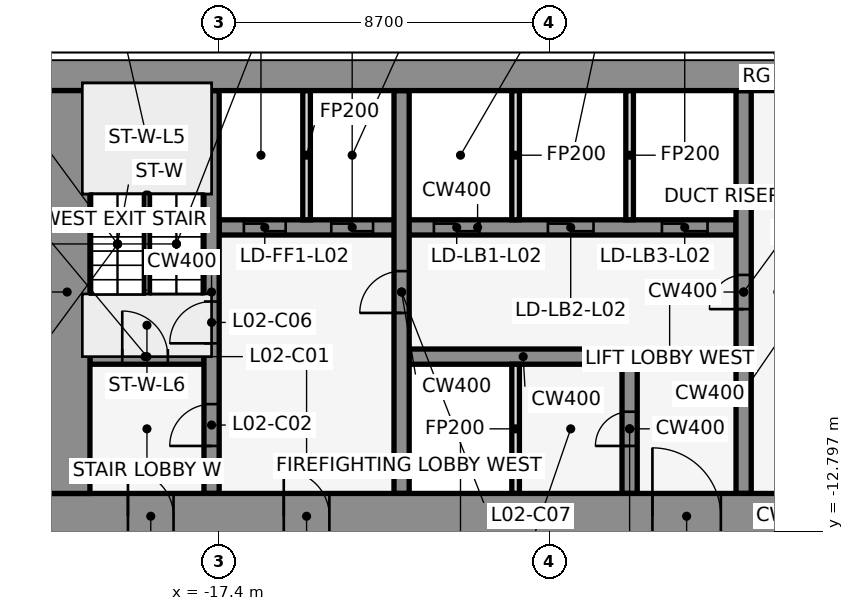
"""IFC4 building model, lengths in metres.
Left out: names, types, materials, properties, quantities, classifications, styles, units other than length and angle.
Written with IfcOpenShell. Run it as: python <this file> out.ifc"""

import sys

from ifc_helpers import new_model, si_unit, direction, frame, frame_2d, origin, place, context, subcontext, project, spatial, rectangle, extrude, element, fill, save


model = new_model("IFC4")
c1 = context("Model", 3, precision=1e-05, world=origin(), true_north=direction((0.0, 1.0)))
c2 = subcontext(c1, "Body", "Model", "MODEL_VIEW")
j1 = project(units=[si_unit("LENGTHUNIT", "METRE"), si_unit("PLANEANGLEUNIT", "RADIAN")], contexts=[c1])
p1 = place(None, origin())
s1 = spatial("IfcSite", under=j1, at=p1, CompositionType="ELEMENT")
p2 = place(p1, origin())
s2 = spatial("IfcBuilding", under=s1, at=p2, CompositionType="ELEMENT")
p3 = place(p2, frame((0.0, 0.0, 14.0)))
s3 = spatial("IfcBuildingStorey", under=s2, at=p3, CompositionType="ELEMENT", Elevation=14.0)
p4 = place(p3, frame((-20.8, -8.2, 0.0), z_axis=(0.0, 0.0, 1.0), x_axis=(1.0, 0.0, 0.0)))
e1 = element("IfcWall", 1, at=p4, inside=s3, PredefinedType="SHEAR", context=c2, shape_type="SweptSolid", body=[
    extrude(rectangle(XDim=3.0, YDim=0.4, at=frame_2d((1.5, 0.0))), origin(), (0.0, 0.0, 1.0), 6.0),
])
p5 = place(p4, frame((0.85, 0.0, 0.0)))
e2 = element("IfcOpeningElement", 2, at=p5, cuts=e1, PredefinedType="OPENING", context=c2, shape_type="SweptSolid", body=[
    extrude(rectangle(XDim=1.2, YDim=2.1, at=frame_2d((0.6, 1.05))), frame((0.0, 0.212, 0.0), z_axis=(0.0, -1.0, 0.0), x_axis=(1.0, 0.0, 0.0)), (0.0, 0.0, 1.0), 0.424),
])
p6 = place(p3, frame((-12.4, -8.2, 0.0), z_axis=(0.0, 0.0, 1.0), x_axis=(1.0, 0.0, 0.0)))
e3 = element("IfcWall", 3, at=p6, inside=s3, PredefinedType="SHEAR", context=c2, shape_type="SweptSolid", body=[
    extrude(rectangle(XDim=6.0, YDim=0.4, at=frame_2d((3.0, 0.0))), origin(), (0.0, 0.0, 1.0), 6.0),
])
p7 = place(p3, frame((-17.4, -4.8, 0.0), z_axis=(0.0, 0.0, 1.0), x_axis=(1.0, 0.0, 0.0)))
e4 = element("IfcWall", 4, at=p7, inside=s3, PredefinedType="SHEAR", context=c2, shape_type="SweptSolid", body=[
    extrude(rectangle(XDim=13.6, YDim=0.4, at=frame_2d((6.8, 0.0))), origin(), (0.0, 0.0, 1.0), 6.0),
])
p8 = place(p7, frame((0.65, 0.0, 0.0)))
e5 = element("IfcOpeningElement", 5, at=p8, cuts=e4, PredefinedType="OPENING", context=c2, shape_type="SweptSolid", body=[
    extrude(rectangle(XDim=1.1, YDim=2.1, at=frame_2d((0.55, 1.05))), frame((0.0, 0.212, 0.0), z_axis=(0.0, -1.0, 0.0), x_axis=(1.0, 0.0, 0.0)), (0.0, 0.0, 1.0), 0.424),
])
p9 = place(p7, frame((2.95, 0.0, 0.0)))
e6 = element("IfcOpeningElement", 6, at=p9, cuts=e4, PredefinedType="OPENING", context=c2, shape_type="SweptSolid", body=[
    extrude(rectangle(XDim=1.1, YDim=2.1, at=frame_2d((0.55, 1.05))), frame((0.0, 0.212, 0.0), z_axis=(0.0, -1.0, 0.0), x_axis=(1.0, 0.0, 0.0)), (0.0, 0.0, 1.0), 0.424),
])
p10 = place(p7, frame((5.65, 0.0, 0.0)))
e7 = element("IfcOpeningElement", 7, at=p10, cuts=e4, PredefinedType="OPENING", context=c2, shape_type="SweptSolid", body=[
    extrude(rectangle(XDim=1.2, YDim=2.1, at=frame_2d((0.6, 1.05))), frame((0.0, 0.212, 0.0), z_axis=(0.0, -1.0, 0.0), x_axis=(1.0, 0.0, 0.0)), (0.0, 0.0, 1.0), 0.424),
])
p11 = place(p7, frame((8.65, 0.0, 0.0)))
e8 = element("IfcOpeningElement", 8, at=p11, cuts=e4, PredefinedType="OPENING", context=c2, shape_type="SweptSolid", body=[
    extrude(rectangle(XDim=1.2, YDim=2.1, at=frame_2d((0.6, 1.05))), frame((0.0, 0.212, 0.0), z_axis=(0.0, -1.0, 0.0), x_axis=(1.0, 0.0, 0.0)), (0.0, 0.0, 1.0), 0.424),
])
p12 = place(p7, frame((11.65, 0.0, 0.0)))
e9 = element("IfcOpeningElement", 9, at=p12, cuts=e4, PredefinedType="OPENING", context=c2, shape_type="SweptSolid", body=[
    extrude(rectangle(XDim=1.2, YDim=2.1, at=frame_2d((0.6, 1.05))), frame((0.0, 0.212, 0.0), z_axis=(0.0, -1.0, 0.0), x_axis=(1.0, 0.0, 0.0)), (0.0, 0.0, 1.0), 0.424),
])
p13 = place(p3, frame((-17.6, -11.8, 0.0), z_axis=(0.0, 0.0, 1.0), x_axis=(0.0, 1.0, 0.0)))
e10 = element("IfcWall", 10, at=p13, inside=s3, PredefinedType="SHEAR", context=c2, shape_type="SweptSolid", body=[
    extrude(rectangle(XDim=10.6, YDim=0.4, at=frame_2d((5.3, 0.0))), origin(), (0.0, 0.0, 1.0), 6.0),
])
p14 = place(p13, frame((1.25, 0.0, 0.0)))
e11 = element("IfcOpeningElement", 11, at=p14, cuts=e10, PredefinedType="OPENING", context=c2, shape_type="SweptSolid", body=[
    extrude(rectangle(XDim=1.1, YDim=2.1, at=frame_2d((0.55, 1.05))), frame((0.0, 0.212, 0.0), z_axis=(0.0, -1.0, 0.0), x_axis=(1.0, 0.0, 0.0)), (0.0, 0.0, 1.0), 0.424),
])
p15 = place(p13, frame((3.95, 0.0, 0.0)))
e12 = element("IfcOpeningElement", 12, at=p15, cuts=e10, PredefinedType="OPENING", context=c2, shape_type="SweptSolid", body=[
    extrude(rectangle(XDim=1.1, YDim=2.1, at=frame_2d((0.55, 1.05))), frame((0.0, 0.212, 0.0), z_axis=(0.0, -1.0, 0.0), x_axis=(1.0, 0.0, 0.0)), (0.0, 0.0, 1.0), 0.424),
])
p16 = place(p3, frame((-15.1, -4.6, 0.0), z_axis=(0.0, 0.0, 1.0), x_axis=(0.0, 1.0, 0.0)))
e13 = element("IfcWall", 13, at=p16, inside=s3, PredefinedType="PARTITIONING", context=c2, shape_type="SweptSolid", body=[
    extrude(rectangle(XDim=3.4, YDim=0.2, at=frame_2d((1.7, 0.0))), origin(), (0.0, 0.0, 1.0), 5.7),
])
p17 = place(p3, frame((-12.6, -11.8, 0.0), z_axis=(0.0, 0.0, 1.0), x_axis=(0.0, 1.0, 0.0)))
e14 = element("IfcWall", 14, at=p17, inside=s3, PredefinedType="SHEAR", context=c2, shape_type="SweptSolid", body=[
    extrude(rectangle(XDim=10.6, YDim=0.4, at=frame_2d((5.3, 0.0))), origin(), (0.0, 0.0, 1.0), 6.0),
])
p18 = place(p17, frame((4.75, 0.0, 0.0)))
e15 = element("IfcOpeningElement", 15, at=p18, cuts=e14, PredefinedType="OPENING", context=c2, shape_type="SweptSolid", body=[
    extrude(rectangle(XDim=1.1, YDim=2.1, at=frame_2d((0.55, 1.05))), frame((0.0, 0.212, 0.0), z_axis=(0.0, -1.0, 0.0), x_axis=(1.0, 0.0, 0.0)), (0.0, 0.0, 1.0), 0.424),
])
for number, where, z_axis, x_axis in (
    (16, (-9.6, -11.8, 0.0), (0.0, 0.0, 1.0), (0.0, 1.0, 0.0)),
    (17, (-9.6, -4.6, 0.0), (0.0, 0.0, 1.0), (0.0, 1.0, 0.0)),
):
    element("IfcWall", number, at=place(p3, frame(where, z_axis=z_axis, x_axis=x_axis)), inside=s3, PredefinedType="PARTITIONING", context=c2, shape_type="SweptSolid", body=[
        extrude(rectangle(XDim=3.4, YDim=0.2, at=frame_2d((1.7, 0.0))), origin(), (0.0, 0.0, 1.0), 5.7),
    ])
p19 = place(p3, frame((-6.6, -11.8, 0.0), z_axis=(0.0, 0.0, 1.0), x_axis=(0.0, 1.0, 0.0)))
e18 = element("IfcWall", 18, at=p19, inside=s3, PredefinedType="SHEAR", context=c2, shape_type="SweptSolid", body=[
    extrude(rectangle(XDim=3.4, YDim=0.4, at=frame_2d((1.7, 0.0))), origin(), (0.0, 0.0, 1.0), 6.0),
])
p20 = place(p19, frame((1.25, 0.0, 0.0)))
e19 = element("IfcOpeningElement", 19, at=p20, cuts=e18, PredefinedType="OPENING", context=c2, shape_type="SweptSolid", body=[
    extrude(rectangle(XDim=0.9, YDim=2.1, at=frame_2d((0.45, 1.05))), frame((0.0, 0.212, 0.0), z_axis=(0.0, -1.0, 0.0), x_axis=(1.0, 0.0, 0.0)), (0.0, 0.0, 1.0), 0.424),
])
p21 = place(p3, frame((-6.6, -4.6, 0.0), z_axis=(0.0, 0.0, 1.0), x_axis=(0.0, 1.0, 0.0)))
e20 = element("IfcWall", 20, at=p21, inside=s3, PredefinedType="PARTITIONING", context=c2, shape_type="SweptSolid", body=[
    extrude(rectangle(XDim=3.4, YDim=0.2, at=frame_2d((1.7, 0.0))), origin(), (0.0, 0.0, 1.0), 5.7),
])
p22 = place(p3, frame((-3.6, -11.8, 0.0), z_axis=(0.0, 0.0, 1.0), x_axis=(0.0, 1.0, 0.0)))
e21 = element("IfcWall", 21, at=p22, inside=s3, PredefinedType="SHEAR", context=c2, shape_type="SweptSolid", body=[
    extrude(rectangle(XDim=10.6, YDim=0.4, at=frame_2d((5.3, 0.0))), origin(), (0.0, 0.0, 1.0), 6.0),
])
p23 = place(p22, frame((4.85, 0.0, 0.0)))
e22 = element("IfcOpeningElement", 22, at=p23, cuts=e21, PredefinedType="OPENING", context=c2, shape_type="SweptSolid", body=[
    extrude(rectangle(XDim=0.9, YDim=2.1, at=frame_2d((0.45, 1.05))), frame((0.0, 0.212, 0.0), z_axis=(0.0, -1.0, 0.0), x_axis=(1.0, 0.0, 0.0)), (0.0, 0.0, 1.0), 0.424),
])
p24 = place(p3, frame((-22.0, -0.6, 0.0), z_axis=(0.0, 0.0, 1.0), x_axis=(1.0, 0.0, 0.0)))
e23 = element("IfcWall", 23, at=p24, inside=s3, PredefinedType="SHEAR", context=c2, shape_type="SweptSolid", body=[
    extrude(rectangle(XDim=44.0, YDim=1.2, at=frame_2d((22.0, 0.0))), origin(), (0.0, 0.0, 1.0), 6.0),
])
p25 = place(p3, frame((-22.0, -12.4, 0.0), z_axis=(0.0, 0.0, 1.0), x_axis=(1.0, 0.0, 0.0)))
e24 = element("IfcWall", 24, at=p25, inside=s3, PredefinedType="SHEAR", context=c2, shape_type="SweptSolid", body=[
    extrude(rectangle(XDim=44.0, YDim=1.2, at=frame_2d((22.0, 0.0))), origin(), (0.0, 0.0, 1.0), 6.0),
])
p26 = place(p25, frame((2.2, 0.0, 0.0)))
e25 = element("IfcOpeningElement", 25, at=p26, cuts=e24, PredefinedType="OPENING", context=c2, shape_type="SweptSolid", body=[
    extrude(rectangle(XDim=1.2, YDim=2.1, at=frame_2d((0.6, 1.05))), frame((0.0, 0.612, 0.0), z_axis=(0.0, -1.0, 0.0), x_axis=(1.0, 0.0, 0.0)), (0.0, 0.0, 1.0), 1.224),
])
p27 = place(p25, frame((21.4, 0.0, 0.0)))
e26 = element("IfcOpeningElement", 26, at=p27, cuts=e24, PredefinedType="OPENING", context=c2, shape_type="SweptSolid", body=[
    extrude(rectangle(XDim=1.2, YDim=2.1, at=frame_2d((0.6, 1.05))), frame((0.0, 0.612, 0.0), z_axis=(0.0, -1.0, 0.0), x_axis=(1.0, 0.0, 0.0)), (0.0, 0.0, 1.0), 1.224),
])
p28 = place(p25, frame((40.6, 0.0, 0.0)))
e27 = element("IfcOpeningElement", 27, at=p28, cuts=e24, PredefinedType="OPENING", context=c2, shape_type="SweptSolid", body=[
    extrude(rectangle(XDim=1.2, YDim=2.1, at=frame_2d((0.6, 1.05))), frame((0.0, 0.612, 0.0), z_axis=(0.0, -1.0, 0.0), x_axis=(1.0, 0.0, 0.0)), (0.0, 0.0, 1.0), 1.224),
])
p29 = place(p25, frame((16.0, 0.0, 0.0)))
e28 = element("IfcOpeningElement", 28, at=p29, cuts=e24, PredefinedType="OPENING", context=c2, shape_type="SweptSolid", body=[
    extrude(rectangle(XDim=1.8, YDim=2.1, at=frame_2d((0.9, 1.05))), frame((0.0, 0.612, 0.0), z_axis=(0.0, -1.0, 0.0), x_axis=(1.0, 0.0, 0.0)), (0.0, 0.0, 1.0), 1.224),
])
p30 = place(p25, frame((6.3, 0.0, 0.0)))
e29 = element("IfcOpeningElement", 29, at=p30, cuts=e24, PredefinedType="OPENING", context=c2, shape_type="SweptSolid", body=[
    extrude(rectangle(XDim=1.2, YDim=2.1, at=frame_2d((0.6, 1.05))), frame((0.0, 0.612, 0.0), z_axis=(0.0, -1.0, 0.0), x_axis=(1.0, 0.0, 0.0)), (0.0, 0.0, 1.0), 1.224),
])
p31 = place(p25, frame((26.2, 0.0, 0.0)))
e30 = element("IfcOpeningElement", 30, at=p31, cuts=e24, PredefinedType="OPENING", context=c2, shape_type="SweptSolid", body=[
    extrude(rectangle(XDim=1.8, YDim=2.1, at=frame_2d((0.9, 1.05))), frame((0.0, 0.612, 0.0), z_axis=(0.0, -1.0, 0.0), x_axis=(1.0, 0.0, 0.0)), (0.0, 0.0, 1.0), 1.224),
])
p32 = place(p25, frame((36.5, 0.0, 0.0)))
e31 = element("IfcOpeningElement", 31, at=p32, cuts=e24, PredefinedType="OPENING", context=c2, shape_type="SweptSolid", body=[
    extrude(rectangle(XDim=1.2, YDim=2.1, at=frame_2d((0.6, 1.05))), frame((0.0, 0.612, 0.0), z_axis=(0.0, -1.0, 0.0), x_axis=(1.0, 0.0, 0.0)), (0.0, 0.0, 1.0), 1.224),
])
p33 = place(p3, frame((-21.4, -11.8, 0.0), z_axis=(0.0, 0.0, 1.0), x_axis=(0.0, 1.0, 0.0)))
e32 = element("IfcWall", 32, at=p33, inside=s3, PredefinedType="SHEAR", context=c2, shape_type="SweptSolid", body=[
    extrude(rectangle(XDim=10.6, YDim=1.2, at=frame_2d((5.3, 0.0))), origin(), (0.0, 0.0, 1.0), 6.0),
])
p34 = place(p5, origin())
e33 = element("IfcDoor", 33, at=p34, inside=s3, OperationType="SINGLE_SWING_LEFT", PredefinedType="DOOR", context=c2, shape_type="SweptSolid", body=[
    extrude(rectangle(XDim=1.2, YDim=2.1, at=frame_2d((0.6, 1.05))), frame((0.0, 0.025, 0.0), z_axis=(0.0, -1.0, 0.0), x_axis=(1.0, 0.0, 0.0)), (0.0, 0.0, 1.0), 0.05),
])
fill(e2, e33)
p35 = place(p14, frame((1.1, 0.0, 0.0), z_axis=(0.0, 0.0, 1.0), x_axis=(-1.0, 0.0, 0.0)))
e34 = element("IfcDoor", 34, at=p35, inside=s3, OperationType="SINGLE_SWING_LEFT", PredefinedType="DOOR", context=c2, shape_type="SweptSolid", body=[
    extrude(rectangle(XDim=1.1, YDim=2.1, at=frame_2d((0.55, 1.05))), frame((0.0, 0.025, 0.0), z_axis=(0.0, -1.0, 0.0), x_axis=(1.0, 0.0, 0.0)), (0.0, 0.0, 1.0), 0.05),
])
fill(e11, e34)
p36 = place(p8, origin())
e35 = element("IfcDoor", 35, at=p36, inside=s3, OperationType="DOUBLE_DOOR_SLIDING", PredefinedType="DOOR", context=c2, shape_type="SweptSolid", body=[
    extrude(rectangle(XDim=1.1, YDim=2.1, at=frame_2d((0.55, 1.05))), frame((0.0, 0.025, 0.0), z_axis=(0.0, -1.0, 0.0), x_axis=(1.0, 0.0, 0.0)), (0.0, 0.0, 1.0), 0.05),
])
fill(e5, e35)
p37 = place(p9, origin())
e36 = element("IfcDoor", 36, at=p37, inside=s3, OperationType="DOUBLE_DOOR_SLIDING", PredefinedType="DOOR", context=c2, shape_type="SweptSolid", body=[
    extrude(rectangle(XDim=1.1, YDim=2.1, at=frame_2d((0.55, 1.05))), frame((0.0, 0.025, 0.0), z_axis=(0.0, -1.0, 0.0), x_axis=(1.0, 0.0, 0.0)), (0.0, 0.0, 1.0), 0.05),
])
fill(e6, e36)
p38 = place(p10, origin())
e37 = element("IfcDoor", 37, at=p38, inside=s3, OperationType="DOUBLE_DOOR_SLIDING", PredefinedType="DOOR", context=c2, shape_type="SweptSolid", body=[
    extrude(rectangle(XDim=1.2, YDim=2.1, at=frame_2d((0.6, 1.05))), frame((0.0, 0.025, 0.0), z_axis=(0.0, -1.0, 0.0), x_axis=(1.0, 0.0, 0.0)), (0.0, 0.0, 1.0), 0.05),
])
fill(e7, e37)
p39 = place(p11, origin())
e38 = element("IfcDoor", 38, at=p39, inside=s3, OperationType="DOUBLE_DOOR_SLIDING", PredefinedType="DOOR", context=c2, shape_type="SweptSolid", body=[
    extrude(rectangle(XDim=1.2, YDim=2.1, at=frame_2d((0.6, 1.05))), frame((0.0, 0.025, 0.0), z_axis=(0.0, -1.0, 0.0), x_axis=(1.0, 0.0, 0.0)), (0.0, 0.0, 1.0), 0.05),
])
fill(e8, e38)
p40 = place(p12, origin())
e39 = element("IfcDoor", 39, at=p40, inside=s3, OperationType="DOUBLE_DOOR_SLIDING", PredefinedType="DOOR", context=c2, shape_type="SweptSolid", body=[
    extrude(rectangle(XDim=1.2, YDim=2.1, at=frame_2d((0.6, 1.05))), frame((0.0, 0.025, 0.0), z_axis=(0.0, -1.0, 0.0), x_axis=(1.0, 0.0, 0.0)), (0.0, 0.0, 1.0), 0.05),
])
fill(e9, e39)
p41 = place(p15, frame((1.1, 0.0, 0.0), z_axis=(0.0, 0.0, 1.0), x_axis=(-1.0, 0.0, 0.0)))
e40 = element("IfcDoor", 40, at=p41, inside=s3, OperationType="SINGLE_SWING_LEFT", PredefinedType="DOOR", context=c2, shape_type="SweptSolid", body=[
    extrude(rectangle(XDim=1.1, YDim=2.1, at=frame_2d((0.55, 1.05))), frame((0.0, 0.025, 0.0), z_axis=(0.0, -1.0, 0.0), x_axis=(1.0, 0.0, 0.0)), (0.0, 0.0, 1.0), 0.05),
])
fill(e12, e40)
p42 = place(p18, origin())
e41 = element("IfcDoor", 41, at=p42, inside=s3, OperationType="SINGLE_SWING_LEFT", PredefinedType="DOOR", context=c2, shape_type="SweptSolid", body=[
    extrude(rectangle(XDim=1.1, YDim=2.1, at=frame_2d((0.55, 1.05))), frame((0.0, 0.025, 0.0), z_axis=(0.0, -1.0, 0.0), x_axis=(1.0, 0.0, 0.0)), (0.0, 0.0, 1.0), 0.05),
])
fill(e15, e41)
p43 = place(p23, frame((0.9, 0.0, 0.0), z_axis=(0.0, 0.0, 1.0), x_axis=(-1.0, 0.0, 0.0)))
e42 = element("IfcDoor", 42, at=p43, inside=s3, OperationType="SINGLE_SWING_LEFT", PredefinedType="DOOR", context=c2, shape_type="SweptSolid", body=[
    extrude(rectangle(XDim=0.9, YDim=2.1, at=frame_2d((0.45, 1.05))), frame((0.0, 0.025, 0.0), z_axis=(0.0, -1.0, 0.0), x_axis=(1.0, 0.0, 0.0)), (0.0, 0.0, 1.0), 0.05),
])
fill(e22, e42)
p44 = place(p20, origin())
e43 = element("IfcDoor", 43, at=p44, inside=s3, OperationType="SINGLE_SWING_LEFT", PredefinedType="DOOR", context=c2, shape_type="SweptSolid", body=[
    extrude(rectangle(XDim=0.9, YDim=2.1, at=frame_2d((0.45, 1.05))), frame((0.0, 0.025, 0.0), z_axis=(0.0, -1.0, 0.0), x_axis=(1.0, 0.0, 0.0)), (0.0, 0.0, 1.0), 0.05),
])
fill(e19, e43)
p45 = place(p26, frame((1.2, 0.0, 0.0), z_axis=(0.0, 0.0, 1.0), x_axis=(-1.0, 0.0, 0.0)))
e44 = element("IfcDoor", 44, at=p45, inside=s3, OperationType="SINGLE_SWING_RIGHT", PredefinedType="DOOR", context=c2, shape_type="SweptSolid", body=[
    extrude(rectangle(XDim=1.2, YDim=2.1, at=frame_2d((0.6, 1.05))), frame((0.0, 0.025, 0.0), z_axis=(0.0, -1.0, 0.0), x_axis=(1.0, 0.0, 0.0)), (0.0, 0.0, 1.0), 0.05),
])
fill(e25, e44)
p46 = place(p29, origin())
e45 = element("IfcDoor", 45, at=p46, inside=s3, OperationType="SINGLE_SWING_LEFT", PredefinedType="DOOR", context=c2, shape_type="SweptSolid", body=[
    extrude(rectangle(XDim=1.8, YDim=2.1, at=frame_2d((0.9, 1.05))), frame((0.0, 0.025, 0.0), z_axis=(0.0, -1.0, 0.0), x_axis=(1.0, 0.0, 0.0)), (0.0, 0.0, 1.0), 0.05),
])
fill(e28, e45)
p47 = place(p30, frame((1.2, 0.0, 0.0), z_axis=(0.0, 0.0, 1.0), x_axis=(-1.0, 0.0, 0.0)))
e46 = element("IfcDoor", 46, at=p47, inside=s3, OperationType="SINGLE_SWING_RIGHT", PredefinedType="DOOR", context=c2, shape_type="SweptSolid", body=[
    extrude(rectangle(XDim=1.2, YDim=2.1, at=frame_2d((0.6, 1.05))), frame((0.0, 0.025, 0.0), z_axis=(0.0, -1.0, 0.0), x_axis=(1.0, 0.0, 0.0)), (0.0, 0.0, 1.0), 0.05),
])
fill(e29, e46)
save(model, sys.argv[1])
